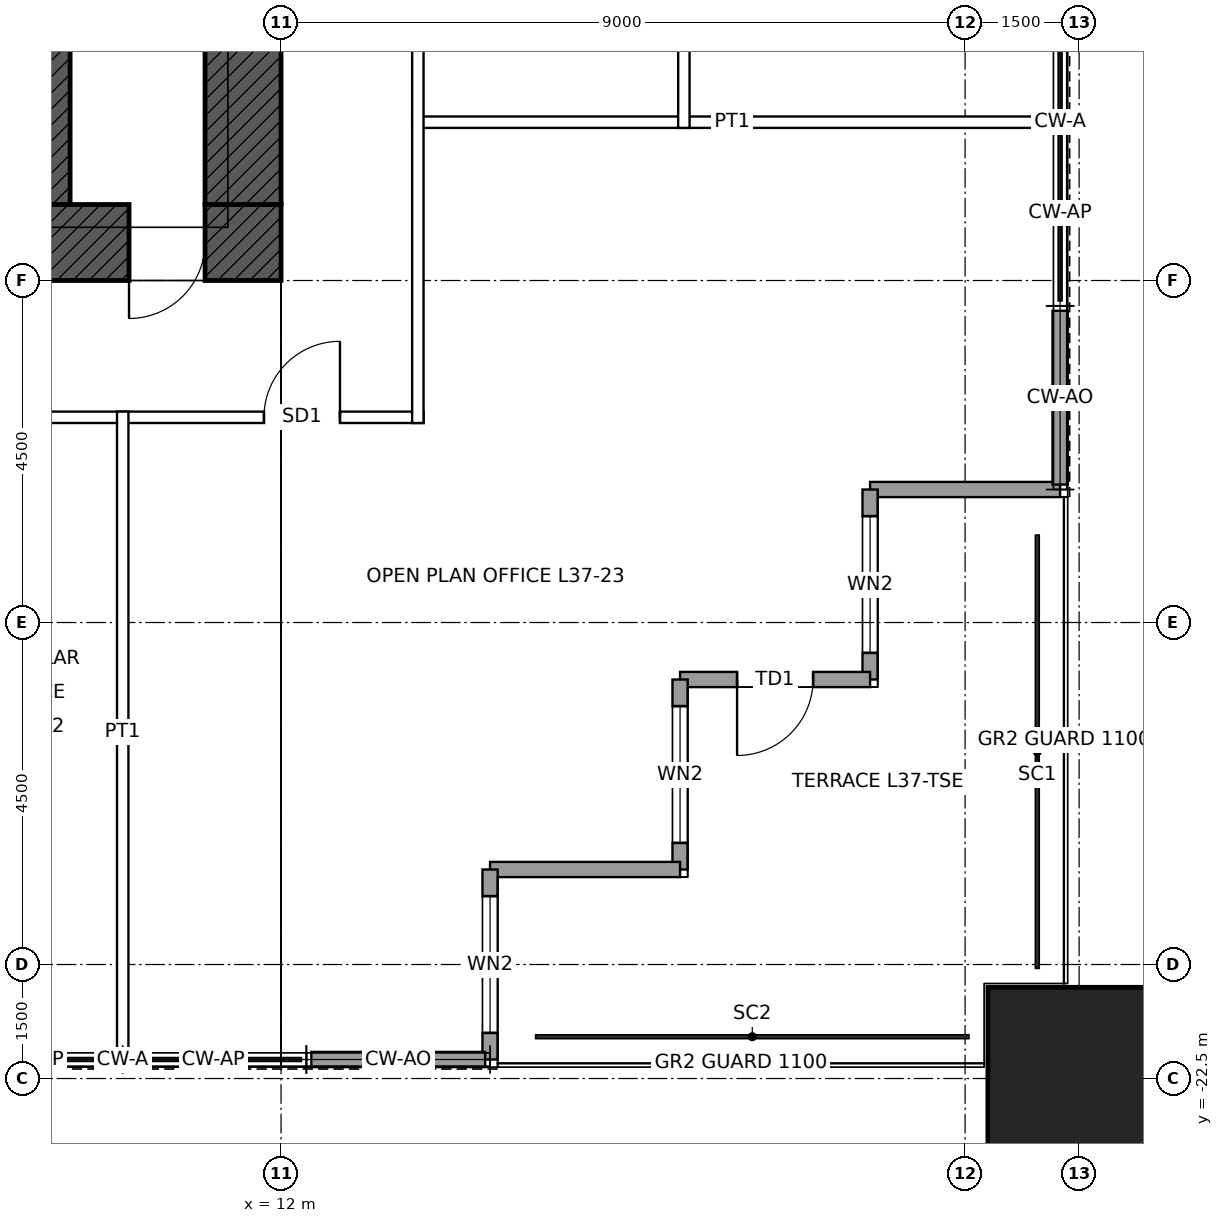
"""IFC4 building model, lengths in metres.
Left out: names, types, materials, properties, quantities, classifications, styles, units other than length and angle.
Written with IfcOpenShell. Run it as: python <this file> out.ifc"""

import sys

from ifc_helpers import new_model, si_unit, direction, frame, frame_2d, origin, origin_2d, place, context, subcontext, project, spatial, rectangle, hollow_rectangle, extrude, element, fill, save


model = new_model("IFC4")
c1 = context("Model", 3, precision=1e-05, world=origin(), true_north=direction((0.0, 1.0)))
c2 = subcontext(c1, "Body", "Model", "MODEL_VIEW")
j1 = project(units=[si_unit("LENGTHUNIT", "METRE"), si_unit("PLANEANGLEUNIT", "RADIAN")], contexts=[c1])
p1 = place(None, origin())
s1 = spatial("IfcSite", under=j1, at=p1, CompositionType="ELEMENT")
p2 = place(p1, origin())
s2 = spatial("IfcBuilding", under=s1, at=p2, CompositionType="ELEMENT")
p3 = place(p2, frame((0.0, 0.0, 181.9)))
s3 = spatial("IfcBuildingStorey", under=s2, at=p3, CompositionType="ELEMENT", Elevation=181.9)
p4 = place(p3, frame((22.5, -22.5, 0.0), z_axis=(0.0, 0.0, 1.0), x_axis=(1.0, 0.0, 0.0)))
e1 = element("IfcColumn", 1, at=p4, inside=s3, PredefinedType="COLUMN", context=c2, shape_type="SweptSolid", body=[
    extrude(hollow_rectangle(XDim=2.4, YDim=2.4, WallThickness=0.12, at=origin_2d()), origin(), (0.0, 0.0, 1.0), 4.0),
])
p5 = place(p3, frame((12.0, -11.5, 0.0), z_axis=(0.0, 0.0, 1.0), x_axis=(-1.0, 0.0, 0.0)))
e2 = element("IfcWall", 2, at=p5, inside=s3, PredefinedType="SHEAR", context=c2, shape_type="SweptSolid", body=[
    extrude(rectangle(XDim=24.0, YDim=1.0, at=frame_2d((12.0, 0.0))), origin(), (0.0, 0.0, 1.0), 4.0),
])
p6 = place(p5, frame((11.5, 0.0, 0.0)))
e3 = element("IfcOpeningElement", 3, at=p6, cuts=e2, PredefinedType="OPENING", context=c2, shape_type="SweptSolid", body=[
    extrude(rectangle(XDim=1.0, YDim=2.1, at=frame_2d((0.5, 1.05))), frame((0.0, 0.51, 0.0), z_axis=(0.0, -1.0, 0.0), x_axis=(1.0, 0.0, 0.0)), (0.0, 0.0, 1.0), 1.02),
])
p7 = place(p5, frame((1.0, 0.0, 0.0)))
e4 = element("IfcOpeningElement", 4, at=p7, cuts=e2, PredefinedType="OPENING", context=c2, shape_type="SweptSolid", body=[
    extrude(rectangle(XDim=1.0, YDim=2.4, at=frame_2d((0.5, 1.2))), frame((0.0, 0.51, 0.0), z_axis=(0.0, -1.0, 0.0), x_axis=(1.0, 0.0, 0.0)), (0.0, 0.0, 1.0), 1.02),
])
p8 = place(p3, frame((11.5, 11.0, 0.0), z_axis=(0.0, 0.0, 1.0), x_axis=(0.0, -1.0, 0.0)))
e5 = element("IfcWall", 5, at=p8, inside=s3, PredefinedType="SHEAR", context=c2, shape_type="SweptSolid", body=[
    extrude(rectangle(XDim=22.0, YDim=1.0, at=frame_2d((11.0, 0.0))), origin(), (0.0, 0.0, 1.0), 4.0),
])
p9 = place(p8, frame((10.5, 0.0, 0.0)))
e6 = element("IfcOpeningElement", 6, at=p9, cuts=e5, PredefinedType="OPENING", context=c2, shape_type="SweptSolid", body=[
    extrude(rectangle(XDim=1.0, YDim=2.4, at=frame_2d((0.5, 1.2))), frame((0.0, 0.51, 0.0), z_axis=(0.0, -1.0, 0.0), x_axis=(1.0, 0.0, 0.0)), (0.0, 0.0, 1.0), 1.02),
])
p10 = place(p3, frame((9.0, -11.0, 0.0), z_axis=(0.0, 0.0, 1.0), x_axis=(0.0, 1.0, 0.0)))
e7 = element("IfcWall", 7, at=p10, inside=s3, PredefinedType="SHEAR", context=c2, shape_type="SweptSolid", body=[
    extrude(rectangle(XDim=6.5, YDim=0.45, at=frame_2d((3.25, 0.0))), origin(), (0.0, 0.0, 1.0), 4.0),
])
p11 = place(p10, frame((4.25, 0.0, 0.0)))
e8 = element("IfcOpeningElement", 8, at=p11, cuts=e7, PredefinedType="OPENING", context=c2, shape_type="SweptSolid", body=[
    extrude(rectangle(XDim=1.0, YDim=2.1, at=frame_2d((0.5, 1.05))), frame((0.0, 0.235, 0.0), z_axis=(0.0, -1.0, 0.0), x_axis=(1.0, 0.0, 0.0)), (0.0, 0.0, 1.0), 0.47),
])
p12 = place(p3, frame((22.25, -14.75, 0.0), z_axis=(0.0, 0.0, 1.0), x_axis=(-1.0, 0.0, 0.0)))
e9 = element("IfcWall", 9, at=p12, inside=s3, PredefinedType="SOLIDWALL", context=c2, shape_type="SweptSolid", body=[
    extrude(rectangle(XDim=2.5, YDim=0.2, at=frame_2d((1.25, 0.0))), origin(), (0.0, 0.0, 1.0), 3.85),
])
p13 = place(p3, frame((19.75, -14.75, 0.0), z_axis=(0.0, 0.0, 1.0), x_axis=(0.0, -1.0, 0.0)))
e10 = element("IfcWall", 10, at=p13, inside=s3, PredefinedType="SOLIDWALL", context=c2, shape_type="SweptSolid", body=[
    extrude(rectangle(XDim=2.5, YDim=0.2, at=frame_2d((1.25, 0.0))), origin(), (0.0, 0.0, 1.0), 3.85),
])
p14 = place(p13, frame((0.35, 0.0, 0.3)))
e11 = element("IfcOpeningElement", 11, at=p14, cuts=e10, PredefinedType="OPENING", context=c2, shape_type="SweptSolid", body=[
    extrude(rectangle(XDim=1.8, YDim=2.4, at=frame_2d((0.9, 1.2))), frame((0.0, 0.11, 0.0), z_axis=(0.0, -1.0, 0.0), x_axis=(1.0, 0.0, 0.0)), (0.0, 0.0, 1.0), 0.22),
])
p15 = place(p3, frame((19.75, -17.25, 0.0), z_axis=(0.0, 0.0, 1.0), x_axis=(-1.0, 0.0, 0.0)))
e12 = element("IfcWall", 12, at=p15, inside=s3, PredefinedType="SOLIDWALL", context=c2, shape_type="SweptSolid", body=[
    extrude(rectangle(XDim=2.5, YDim=0.2, at=frame_2d((1.25, 0.0))), origin(), (0.0, 0.0, 1.0), 3.85),
])
p16 = place(p15, frame((0.75, 0.0, 0.0)))
e13 = element("IfcOpeningElement", 13, at=p16, cuts=e12, PredefinedType="OPENING", context=c2, shape_type="SweptSolid", body=[
    extrude(rectangle(XDim=1.0, YDim=2.4, at=frame_2d((0.5, 1.2))), frame((0.0, 0.11, 0.0), z_axis=(0.0, -1.0, 0.0), x_axis=(1.0, 0.0, 0.0)), (0.0, 0.0, 1.0), 0.22),
])
p17 = place(p3, frame((17.25, -17.25, 0.0), z_axis=(0.0, 0.0, 1.0), x_axis=(0.0, -1.0, 0.0)))
e14 = element("IfcWall", 14, at=p17, inside=s3, PredefinedType="SOLIDWALL", context=c2, shape_type="SweptSolid", body=[
    extrude(rectangle(XDim=2.5, YDim=0.2, at=frame_2d((1.25, 0.0))), origin(), (0.0, 0.0, 1.0), 3.85),
])
p18 = place(p17, frame((0.35, 0.0, 0.3)))
e15 = element("IfcOpeningElement", 15, at=p18, cuts=e14, PredefinedType="OPENING", context=c2, shape_type="SweptSolid", body=[
    extrude(rectangle(XDim=1.8, YDim=2.4, at=frame_2d((0.9, 1.2))), frame((0.0, 0.11, 0.0), z_axis=(0.0, -1.0, 0.0), x_axis=(1.0, 0.0, 0.0)), (0.0, 0.0, 1.0), 0.22),
])
p19 = place(p3, frame((17.25, -19.75, 0.0), z_axis=(0.0, 0.0, 1.0), x_axis=(-1.0, 0.0, 0.0)))
e16 = element("IfcWall", 16, at=p19, inside=s3, PredefinedType="SOLIDWALL", context=c2, shape_type="SweptSolid", body=[
    extrude(rectangle(XDim=2.5, YDim=0.2, at=frame_2d((1.25, 0.0))), origin(), (0.0, 0.0, 1.0), 3.85),
])
p20 = place(p3, frame((14.75, -19.75, 0.0), z_axis=(0.0, 0.0, 1.0), x_axis=(0.0, -1.0, 0.0)))
e17 = element("IfcWall", 17, at=p20, inside=s3, PredefinedType="SOLIDWALL", context=c2, shape_type="SweptSolid", body=[
    extrude(rectangle(XDim=2.5, YDim=0.2, at=frame_2d((1.25, 0.0))), origin(), (0.0, 0.0, 1.0), 3.85),
])
p21 = place(p20, frame((0.35, 0.0, 0.3)))
e18 = element("IfcOpeningElement", 18, at=p21, cuts=e17, PredefinedType="OPENING", context=c2, shape_type="SweptSolid", body=[
    extrude(rectangle(XDim=1.8, YDim=2.4, at=frame_2d((0.9, 1.2))), frame((0.0, 0.11, 0.0), z_axis=(0.0, -1.0, 0.0), x_axis=(1.0, 0.0, 0.0)), (0.0, 0.0, 1.0), 0.22),
])
for number, where, z_axis, x_axis in (
    (19, (22.25, -12.398, 0.0), (0.0, 0.0, 1.0), (0.0, -1.0, 0.0)),
    (20, (14.685, -22.25, 0.0), (0.0, 0.0, 1.0), (-1.0, 0.0, 0.0)),
):
    element("IfcWall", number, at=place(p3, frame(where, z_axis=z_axis, x_axis=x_axis)), inside=s3, PredefinedType="SOLIDWALL", context=c2, shape_type="SweptSolid", body=[
        extrude(rectangle(XDim=2.287, YDim=0.2, at=frame_2d((1.144, 0.0))), origin(), (0.0, 0.0, 1.0), 3.85),
    ])
p22 = place(p3, frame((-13.875, -13.8, 0.0), z_axis=(0.0, 0.0, 1.0), x_axis=(1.0, 0.0, 0.0)))
e21 = element("IfcWall", 21, at=p22, inside=s3, PredefinedType="PARTITIONING", context=c2, shape_type="SweptSolid", body=[
    extrude(rectangle(XDim=27.75, YDim=0.15, at=frame_2d((13.875, 0.0))), origin(), (0.0, 0.0, 1.0), 3.85),
])
p23 = place(p22, frame((18.375, 0.0, 0.0)))
e22 = element("IfcOpeningElement", 22, at=p23, cuts=e21, PredefinedType="OPENING", context=c2, shape_type="SweptSolid", body=[
    extrude(rectangle(XDim=1.0, YDim=2.4, at=frame_2d((0.5, 1.2))), frame((0.0, 0.085, 0.0), z_axis=(0.0, -1.0, 0.0), x_axis=(1.0, 0.0, 0.0)), (0.0, 0.0, 1.0), 0.17),
])
p24 = place(p22, frame((14.975, 0.0, 0.0)))
e23 = element("IfcOpeningElement", 23, at=p24, cuts=e21, PredefinedType="OPENING", context=c2, shape_type="SweptSolid", body=[
    extrude(rectangle(XDim=1.0, YDim=2.1, at=frame_2d((0.5, 1.05))), frame((0.0, 0.085, 0.0), z_axis=(0.0, -1.0, 0.0), x_axis=(1.0, 0.0, 0.0)), (0.0, 0.0, 1.0), 0.17),
])
p25 = place(p22, frame((11.775, 0.0, 0.0)))
e24 = element("IfcOpeningElement", 24, at=p25, cuts=e21, PredefinedType="OPENING", context=c2, shape_type="SweptSolid", body=[
    extrude(rectangle(XDim=1.0, YDim=2.1, at=frame_2d((0.5, 1.05))), frame((0.0, 0.085, 0.0), z_axis=(0.0, -1.0, 0.0), x_axis=(1.0, 0.0, 0.0)), (0.0, 0.0, 1.0), 0.17),
])
p26 = place(p22, frame((8.375, 0.0, 0.0)))
e25 = element("IfcOpeningElement", 25, at=p26, cuts=e21, PredefinedType="OPENING", context=c2, shape_type="SweptSolid", body=[
    extrude(rectangle(XDim=1.0, YDim=2.4, at=frame_2d((0.5, 1.2))), frame((0.0, 0.085, 0.0), z_axis=(0.0, -1.0, 0.0), x_axis=(1.0, 0.0, 0.0)), (0.0, 0.0, 1.0), 0.17),
])
p27 = place(p22, frame((25.65, 0.0, 0.0)))
e26 = element("IfcOpeningElement", 26, at=p27, cuts=e21, PredefinedType="OPENING", context=c2, shape_type="SweptSolid", body=[
    extrude(rectangle(XDim=1.0, YDim=2.4, at=frame_2d((0.5, 1.2))), frame((0.0, 0.085, 0.0), z_axis=(0.0, -1.0, 0.0), x_axis=(1.0, 0.0, 0.0)), (0.0, 0.0, 1.0), 0.17),
])
p28 = place(p22, frame((1.517, 0.0, 0.0)))
e27 = element("IfcOpeningElement", 27, at=p28, cuts=e21, PredefinedType="OPENING", context=c2, shape_type="SweptSolid", body=[
    extrude(rectangle(XDim=1.0, YDim=2.4, at=frame_2d((0.5, 1.2))), frame((0.0, 0.085, 0.0), z_axis=(0.0, -1.0, 0.0), x_axis=(1.0, 0.0, 0.0)), (0.0, 0.0, 1.0), 0.17),
])
for number, where, z_axis, x_axis in (
    (28, (13.725, -9.917, 0.0), (0.0, 0.0, 1.0), (1.0, 0.0, 0.0)),
    (29, (9.917, -22.15, 0.0), (0.0, 0.0, 1.0), (0.0, 1.0, 0.0)),
):
    element("IfcWall", number, at=place(p3, frame(where, z_axis=z_axis, x_axis=x_axis)), inside=s3, PredefinedType="PARTITIONING", context=c2, shape_type="SweptSolid", body=[
        extrude(rectangle(XDim=8.425, YDim=0.15, at=frame_2d((4.212, 0.0))), origin(), (0.0, 0.0, 1.0), 3.85),
    ])
p29 = place(p3, frame((13.8, -13.875, 0.0), z_axis=(0.0, 0.0, 1.0), x_axis=(0.0, 1.0, 0.0)))
e30 = element("IfcWall", 30, at=p29, inside=s3, PredefinedType="PARTITIONING", context=c2, shape_type="SweptSolid", body=[
    extrude(rectangle(XDim=18.95, YDim=0.15, at=frame_2d((9.475, 0.0))), origin(), (0.0, 0.0, 1.0), 3.85),
])
p30 = place(p29, frame((15.875, 0.0, 0.0)))
e31 = element("IfcOpeningElement", 31, at=p30, cuts=e30, PredefinedType="OPENING", context=c2, shape_type="SweptSolid", body=[
    extrude(rectangle(XDim=1.0, YDim=2.4, at=frame_2d((0.5, 1.2))), frame((0.0, 0.085, 0.0), z_axis=(0.0, -1.0, 0.0), x_axis=(1.0, 0.0, 0.0)), (0.0, 0.0, 1.0), 0.17),
])
p31 = place(p29, frame((10.875, 0.0, 0.0)))
e32 = element("IfcOpeningElement", 32, at=p31, cuts=e30, PredefinedType="OPENING", context=c2, shape_type="SweptSolid", body=[
    extrude(rectangle(XDim=1.0, YDim=2.4, at=frame_2d((0.5, 1.2))), frame((0.0, 0.085, 0.0), z_axis=(0.0, -1.0, 0.0), x_axis=(1.0, 0.0, 0.0)), (0.0, 0.0, 1.0), 0.17),
])
p32 = place(p3, frame((17.3, -9.992, 0.0), z_axis=(0.0, 0.0, 1.0), x_axis=(0.0, 1.0, 0.0)))
e33 = element("IfcWall", 33, at=p32, inside=s3, PredefinedType="PARTITIONING", context=c2, shape_type="SweptSolid", body=[
    extrude(rectangle(XDim=5.067, YDim=0.15, at=frame_2d((2.533, 0.0))), origin(), (0.0, 0.0, 1.0), 3.85),
])
p33 = place(p32, frame((2.033, 0.0, 0.0)))
e34 = element("IfcOpeningElement", 34, at=p33, cuts=e33, PredefinedType="OPENING", context=c2, shape_type="SweptSolid", body=[
    extrude(rectangle(XDim=1.0, YDim=2.1, at=frame_2d((0.5, 1.05))), frame((0.0, 0.085, 0.0), z_axis=(0.0, -1.0, 0.0), x_axis=(1.0, 0.0, 0.0)), (0.0, 0.0, 1.0), 0.17),
])
p34 = place(p14, origin())
e35 = element("IfcWindow", 35, at=p34, inside=s3, PartitioningType="SINGLE_PANEL", PredefinedType="WINDOW", context=c2, shape_type="SweptSolid", body=[
    extrude(rectangle(XDim=1.8, YDim=2.4, at=frame_2d((0.9, 1.2))), frame((0.0, 0.03, 0.0), z_axis=(0.0, -1.0, 0.0), x_axis=(1.0, 0.0, 0.0)), (0.0, 0.0, 1.0), 0.06),
])
fill(e11, e35)
p35 = place(p16, origin())
e36 = element("IfcDoor", 36, at=p35, inside=s3, OperationType="SINGLE_SWING_RIGHT", PredefinedType="DOOR", context=c2, shape_type="SweptSolid", body=[
    extrude(rectangle(XDim=1.0, YDim=2.4, at=frame_2d((0.5, 1.2))), frame((0.0, 0.025, 0.0), z_axis=(0.0, -1.0, 0.0), x_axis=(1.0, 0.0, 0.0)), (0.0, 0.0, 1.0), 0.05),
])
fill(e13, e36)
p36 = place(p18, origin())
e37 = element("IfcWindow", 37, at=p36, inside=s3, PartitioningType="SINGLE_PANEL", PredefinedType="WINDOW", context=c2, shape_type="SweptSolid", body=[
    extrude(rectangle(XDim=1.8, YDim=2.4, at=frame_2d((0.9, 1.2))), frame((0.0, 0.03, 0.0), z_axis=(0.0, -1.0, 0.0), x_axis=(1.0, 0.0, 0.0)), (0.0, 0.0, 1.0), 0.06),
])
fill(e15, e37)
p37 = place(p21, origin())
e38 = element("IfcWindow", 38, at=p37, inside=s3, PartitioningType="SINGLE_PANEL", PredefinedType="WINDOW", context=c2, shape_type="SweptSolid", body=[
    extrude(rectangle(XDim=1.8, YDim=2.4, at=frame_2d((0.9, 1.2))), frame((0.0, 0.03, 0.0), z_axis=(0.0, -1.0, 0.0), x_axis=(1.0, 0.0, 0.0)), (0.0, 0.0, 1.0), 0.06),
])
fill(e18, e38)
p38 = place(p7, origin())
e39 = element("IfcDoor", 39, at=p38, inside=s3, OperationType="SINGLE_SWING_RIGHT", PredefinedType="DOOR", context=c2, shape_type="SweptSolid", body=[
    extrude(rectangle(XDim=1.0, YDim=2.4, at=frame_2d((0.5, 1.2))), frame((0.0, 0.485, 0.0), z_axis=(0.0, -1.0, 0.0), x_axis=(1.0, 0.0, 0.0)), (0.0, 0.0, 1.0), 0.05),
])
fill(e4, e39)
p39 = place(p27, origin())
e40 = element("IfcDoor", 40, at=p39, inside=s3, OperationType="SINGLE_SWING_RIGHT", PredefinedType="DOOR", context=c2, shape_type="SweptSolid", body=[
    extrude(rectangle(XDim=1.0, YDim=2.4, at=frame_2d((0.5, 1.2))), frame((0.0, 0.025, 0.0), z_axis=(0.0, -1.0, 0.0), x_axis=(1.0, 0.0, 0.0)), (0.0, 0.0, 1.0), 0.05),
])
fill(e26, e40)
save(model, sys.argv[1])
